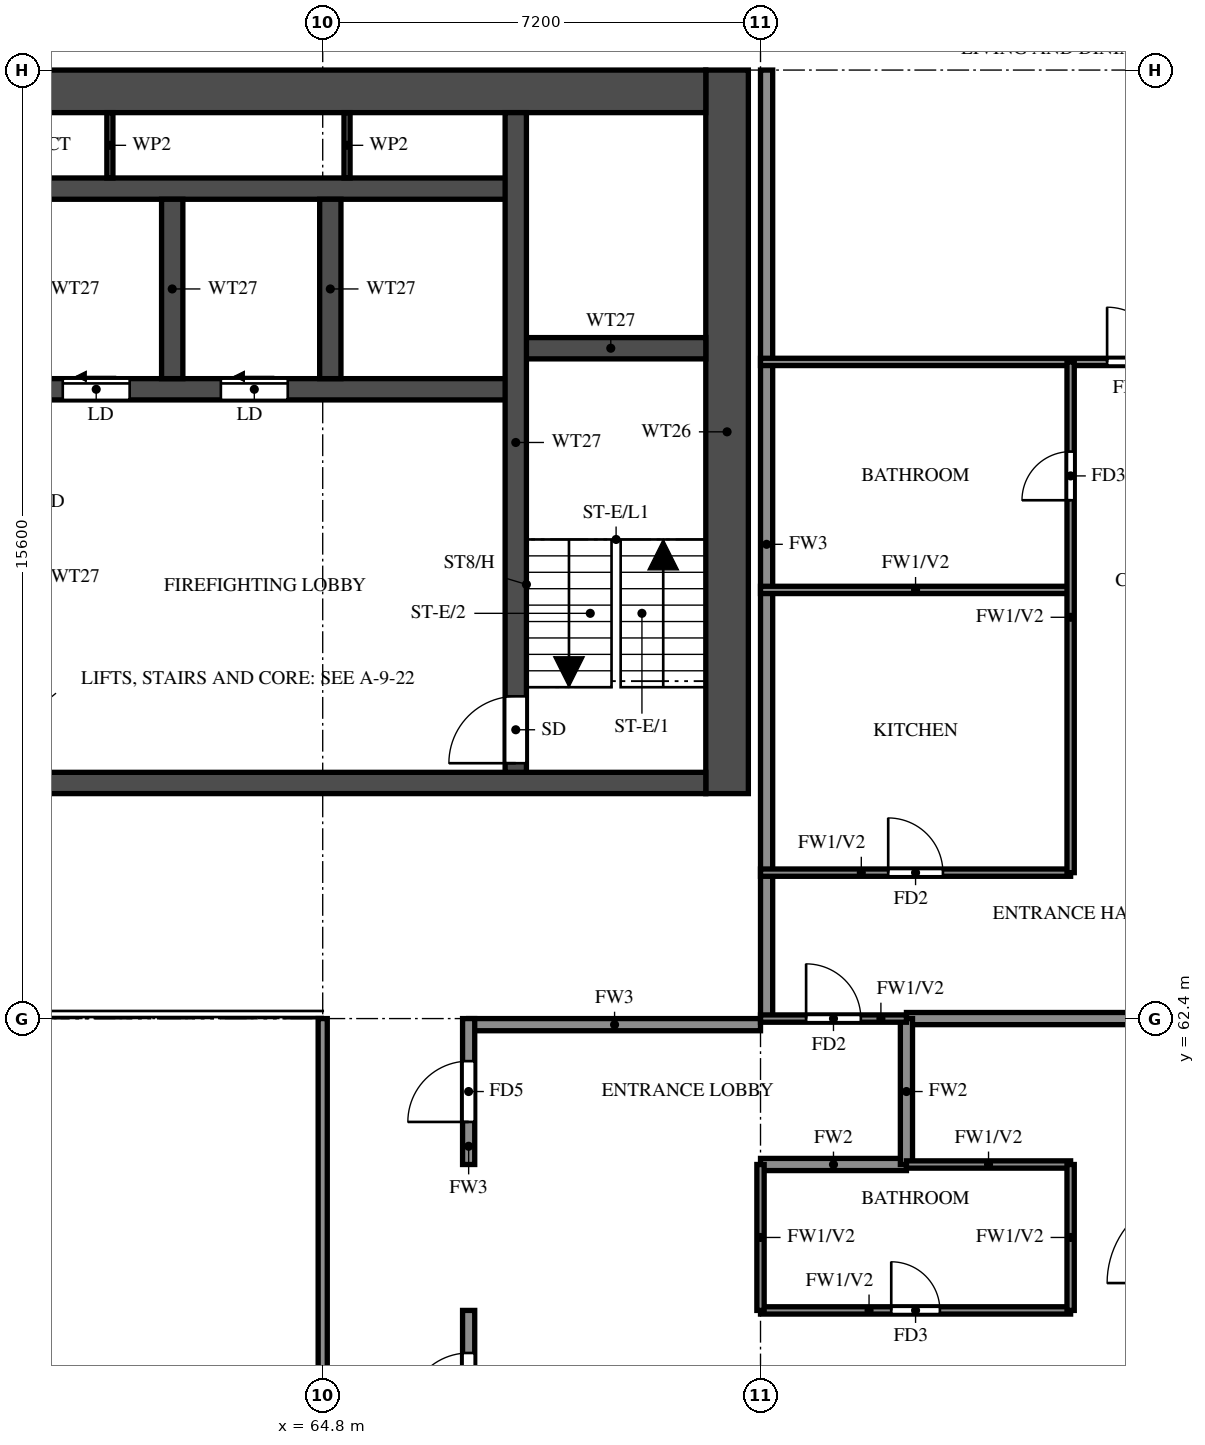
"""IFC4 building model, lengths in metres.
Left out: names, types, materials, properties, quantities, classifications, styles, units other than length and angle.
Written with IfcOpenShell. Run it as: python <this file> out.ifc"""

import sys

from ifc_helpers import new_model, si_unit, direction, frame, frame_2d, origin, place, context, subcontext, project, spatial, rectangle, extrude, element, fill, save


model = new_model("IFC4")
c1 = context("Model", 3, precision=1e-05, world=origin(), true_north=direction((0.0, 1.0)))
c2 = subcontext(c1, "Body", "Model", "MODEL_VIEW")
j1 = project(units=[si_unit("LENGTHUNIT", "METRE"), si_unit("PLANEANGLEUNIT", "RADIAN")], contexts=[c1])
p1 = place(None, origin())
s1 = spatial("IfcSite", under=j1, at=p1, CompositionType="ELEMENT")
p2 = place(p1, origin())
s2 = spatial("IfcBuilding", under=s1, at=p2, CompositionType="ELEMENT")
p3 = place(p2, frame((0.0, 0.0, 153.5)))
s3 = spatial("IfcBuildingStorey", under=s2, at=p3, CompositionType="ELEMENT", Elevation=153.5)
p4 = place(p3, frame((71.45, 66.1, 0.0), z_axis=(0.0, 0.0, 1.0), x_axis=(0.0, 1.0, 0.0)))
e1 = element("IfcWall", 1, at=p4, inside=s3, PredefinedType="SHEAR", context=c2, shape_type="SweptSolid", body=[
    extrude(rectangle(XDim=11.9, YDim=0.7, at=frame_2d((5.95, 0.0))), origin(), (0.0, 0.0, 1.0), 3.2),
])
p5 = place(p3, frame((29.7, 77.65, 0.0), z_axis=(0.0, 0.0, 1.0), x_axis=(1.0, 0.0, 0.0)))
e2 = element("IfcWall", 2, at=p5, inside=s3, PredefinedType="SHEAR", context=c2, shape_type="SweptSolid", body=[
    extrude(rectangle(XDim=41.4, YDim=0.7, at=frame_2d((20.7, 0.0))), origin(), (0.0, 0.0, 1.0), 3.2),
])
p6 = place(p3, frame((29.7, 66.275, 0.0), z_axis=(0.0, 0.0, 1.0), x_axis=(1.0, 0.0, 0.0)))
e3 = element("IfcWall", 3, at=p6, inside=s3, PredefinedType="SHEAR", context=c2, shape_type="SweptSolid", body=[
    extrude(rectangle(XDim=41.4, YDim=0.35, at=frame_2d((20.7, 0.0))), origin(), (0.0, 0.0, 1.0), 3.2),
])
p7 = place(p6, frame((0.925, 0.0, 0.0)))
e4 = element("IfcOpeningElement", 4, at=p7, cuts=e3, PredefinedType="OPENING", context=c2, shape_type="SweptSolid", body=[
    extrude(rectangle(XDim=1.1, YDim=2.1, at=frame_2d((0.55, 1.05))), frame((0.0, 0.185, 0.0), z_axis=(0.0, -1.0, 0.0), x_axis=(1.0, 0.0, 0.0)), (0.0, 0.0, 1.0), 0.37),
])
p8 = place(p6, frame((3.712, 0.0, 0.0)))
e5 = element("IfcOpeningElement", 5, at=p8, cuts=e3, PredefinedType="OPENING", context=c2, shape_type="SweptSolid", body=[
    extrude(rectangle(XDim=1.8, YDim=2.1, at=frame_2d((0.9, 1.05))), frame((0.0, 0.185, 0.0), z_axis=(0.0, -1.0, 0.0), x_axis=(1.0, 0.0, 0.0)), (0.0, 0.0, 1.0), 0.37),
])
p9 = place(p3, frame((32.825, 72.75, 0.0), z_axis=(0.0, 0.0, 1.0), x_axis=(1.0, 0.0, 0.0)))
e6 = element("IfcWall", 6, at=p9, inside=s3, PredefinedType="SHEAR", context=c2, shape_type="SweptSolid", body=[
    extrude(rectangle(XDim=35.15, YDim=0.35, at=frame_2d((17.575, 0.0))), origin(), (0.0, 0.0, 1.0), 3.2),
])
p10 = place(p9, frame((19.8, 0.0, 0.0)))
e7 = element("IfcOpeningElement", 7, at=p10, cuts=e6, PredefinedType="OPENING", context=c2, shape_type="SweptSolid", body=[
    extrude(rectangle(XDim=1.1, YDim=2.1, at=frame_2d((0.55, 1.05))), frame((0.0, 0.185, 0.0), z_axis=(0.0, -1.0, 0.0), x_axis=(1.0, 0.0, 0.0)), (0.0, 0.0, 1.0), 0.37),
])
p11 = place(p9, frame((27.7, 0.0, 0.0)))
e8 = element("IfcOpeningElement", 8, at=p11, cuts=e6, PredefinedType="OPENING", context=c2, shape_type="SweptSolid", body=[
    extrude(rectangle(XDim=1.1, YDim=2.1, at=frame_2d((0.55, 1.05))), frame((0.0, 0.185, 0.0), z_axis=(0.0, -1.0, 0.0), x_axis=(1.0, 0.0, 0.0)), (0.0, 0.0, 1.0), 0.37),
])
p12 = place(p9, frame((30.3, 0.0, 0.0)))
e9 = element("IfcOpeningElement", 9, at=p12, cuts=e6, PredefinedType="OPENING", context=c2, shape_type="SweptSolid", body=[
    extrude(rectangle(XDim=1.1, YDim=2.1, at=frame_2d((0.55, 1.05))), frame((0.0, 0.185, 0.0), z_axis=(0.0, -1.0, 0.0), x_axis=(1.0, 0.0, 0.0)), (0.0, 0.0, 1.0), 0.37),
])
p13 = place(p9, frame((3.8, 0.0, 0.0)))
e10 = element("IfcOpeningElement", 10, at=p13, cuts=e6, PredefinedType="OPENING", context=c2, shape_type="SweptSolid", body=[
    extrude(rectangle(XDim=1.1, YDim=2.1, at=frame_2d((0.55, 1.05))), frame((0.0, 0.185, 0.0), z_axis=(0.0, -1.0, 0.0), x_axis=(1.0, 0.0, 0.0)), (0.0, 0.0, 1.0), 0.37),
])
p14 = place(p9, frame((6.55, 0.0, 0.0)))
e11 = element("IfcOpeningElement", 11, at=p14, cuts=e6, PredefinedType="OPENING", context=c2, shape_type="SweptSolid", body=[
    extrude(rectangle(XDim=1.1, YDim=2.1, at=frame_2d((0.55, 1.05))), frame((0.0, 0.185, 0.0), z_axis=(0.0, -1.0, 0.0), x_axis=(1.0, 0.0, 0.0)), (0.0, 0.0, 1.0), 0.37),
])
p15 = place(p9, frame((9.3, 0.0, 0.0)))
e12 = element("IfcOpeningElement", 12, at=p15, cuts=e6, PredefinedType="OPENING", context=c2, shape_type="SweptSolid", body=[
    extrude(rectangle(XDim=1.1, YDim=2.1, at=frame_2d((0.55, 1.05))), frame((0.0, 0.185, 0.0), z_axis=(0.0, -1.0, 0.0), x_axis=(1.0, 0.0, 0.0)), (0.0, 0.0, 1.0), 0.37),
])
p16 = place(p9, frame((12.05, 0.0, 0.0)))
e13 = element("IfcOpeningElement", 13, at=p16, cuts=e6, PredefinedType="OPENING", context=c2, shape_type="SweptSolid", body=[
    extrude(rectangle(XDim=1.1, YDim=2.1, at=frame_2d((0.55, 1.05))), frame((0.0, 0.185, 0.0), z_axis=(0.0, -1.0, 0.0), x_axis=(1.0, 0.0, 0.0)), (0.0, 0.0, 1.0), 0.37),
])
p17 = place(p9, frame((14.8, 0.0, 0.0)))
e14 = element("IfcOpeningElement", 14, at=p17, cuts=e6, PredefinedType="OPENING", context=c2, shape_type="SweptSolid", body=[
    extrude(rectangle(XDim=1.1, YDim=2.1, at=frame_2d((0.55, 1.05))), frame((0.0, 0.185, 0.0), z_axis=(0.0, -1.0, 0.0), x_axis=(1.0, 0.0, 0.0)), (0.0, 0.0, 1.0), 0.37),
])
p18 = place(p9, frame((17.55, 0.0, 0.0)))
e15 = element("IfcOpeningElement", 15, at=p18, cuts=e6, PredefinedType="OPENING", context=c2, shape_type="SweptSolid", body=[
    extrude(rectangle(XDim=1.1, YDim=2.1, at=frame_2d((0.55, 1.05))), frame((0.0, 0.185, 0.0), z_axis=(0.0, -1.0, 0.0), x_axis=(1.0, 0.0, 0.0)), (0.0, 0.0, 1.0), 0.37),
])
p19 = place(p9, frame((0.938, 0.0, 0.0)))
e16 = element("IfcOpeningElement", 16, at=p19, cuts=e6, PredefinedType="OPENING", context=c2, shape_type="SweptSolid", body=[
    extrude(rectangle(XDim=1.1, YDim=2.1, at=frame_2d((0.55, 1.05))), frame((0.0, 0.185, 0.0), z_axis=(0.0, -1.0, 0.0), x_axis=(1.0, 0.0, 0.0)), (0.0, 0.0, 1.0), 0.37),
])
p20 = place(p3, frame((32.825, 76.05, 0.0), z_axis=(0.0, 0.0, 1.0), x_axis=(1.0, 0.0, 0.0)))
e17 = element("IfcWall", 17, at=p20, inside=s3, PredefinedType="SHEAR", context=c2, shape_type="SweptSolid", body=[
    extrude(rectangle(XDim=35.15, YDim=0.35, at=frame_2d((17.575, 0.0))), origin(), (0.0, 0.0, 1.0), 3.2),
])
p21 = place(p3, frame((67.975, 73.425, 0.0), z_axis=(0.0, 0.0, 1.0), x_axis=(1.0, 0.0, 0.0)))
e18 = element("IfcWall", 18, at=p21, inside=s3, PredefinedType="SHEAR", context=c2, shape_type="SweptSolid", body=[
    extrude(rectangle(XDim=3.125, YDim=0.35, at=frame_2d((1.562, 0.0))), origin(), (0.0, 0.0, 1.0), 3.2),
])
p22 = place(p3, frame((67.975, 66.45, 0.0), z_axis=(0.0, 0.0, 1.0), x_axis=(0.0, 1.0, 0.0)))
e19 = element("IfcWall", 19, at=p22, inside=s3, PredefinedType="SHEAR", context=c2, shape_type="SweptSolid", body=[
    extrude(rectangle(XDim=10.85, YDim=0.35, at=frame_2d((5.425, 0.0))), origin(), (0.0, 0.0, 1.0), 3.2),
])
p23 = place(p22, frame((0.15, 0.0, 0.0)))
e20 = element("IfcOpeningElement", 20, at=p23, cuts=e19, PredefinedType="OPENING", context=c2, shape_type="SweptSolid", body=[
    extrude(rectangle(XDim=1.1, YDim=2.1, at=frame_2d((0.55, 1.05))), frame((0.0, 0.185, 0.0), z_axis=(0.0, -1.0, 0.0), x_axis=(1.0, 0.0, 0.0)), (0.0, 0.0, 1.0), 0.37),
])
for number, where, z_axis, x_axis in (
    (21, (62.325, 72.925, 0.0), (0.0, 0.0, 1.0), (0.0, 1.0, 0.0)),
    (22, (64.925, 72.925, 0.0), (0.0, 0.0, 1.0), (0.0, 1.0, 0.0)),
):
    element("IfcWall", number, at=place(p3, frame(where, z_axis=z_axis, x_axis=x_axis)), inside=s3, PredefinedType="SHEAR", context=c2, shape_type="SweptSolid", body=[
        extrude(rectangle(XDim=2.95, YDim=0.35, at=frame_2d((1.475, 0.0))), origin(), (0.0, 0.0, 1.0), 3.2),
    ])
for number, where, z_axis, x_axis in (
    (23, (61.3, 76.225, 0.0), (0.0, 0.0, 1.0), (0.0, 1.0, 0.0)),
    (24, (65.2, 76.225, 0.0), (0.0, 0.0, 1.0), (0.0, 1.0, 0.0)),
):
    element("IfcWall", number, at=place(p3, frame(where, z_axis=z_axis, x_axis=x_axis)), inside=s3, PredefinedType="PARTITIONING", context=c2, shape_type="SweptSolid", body=[
        extrude(rectangle(XDim=1.075, YDim=0.1, at=frame_2d((0.538, 0.0))), origin(), (0.0, 0.0, 1.0), 3.2),
    ])
p24 = place(p3, frame((67.2, 62.3, 0.0), z_axis=(0.0, 0.0, 1.0), x_axis=(1.0, 0.0, 0.0)))
e25 = element("IfcWall", 25, at=p24, inside=s3, PredefinedType="SOLIDWALL", context=c2, shape_type="SweptSolid", body=[
    extrude(rectangle(XDim=4.8, YDim=0.2, at=frame_2d((2.4, 0.0))), origin(), (0.0, 0.0, 1.0), 3.2),
])
p25 = place(p3, frame((67.2, 45.6, 0.0), z_axis=(0.0, 0.0, 1.0), x_axis=(0.0, 1.0, 0.0)))
e26 = element("IfcWall", 26, at=p25, inside=s3, PredefinedType="SOLIDWALL", context=c2, shape_type="SweptSolid", body=[
    extrude(rectangle(XDim=12.0, YDim=0.2, at=frame_2d((6.0, 0.0))), origin(), (0.0, 0.0, 1.0), 3.2),
])
p26 = place(p25, frame((10.3, 0.0, 0.0)))
e27 = element("IfcOpeningElement", 27, at=p26, cuts=e26, PredefinedType="OPENING", context=c2, shape_type="SweptSolid", body=[
    extrude(rectangle(XDim=1.0, YDim=2.1, at=frame_2d((0.5, 1.05))), frame((0.0, 0.11, 0.0), z_axis=(0.0, -1.0, 0.0), x_axis=(1.0, 0.0, 0.0)), (0.0, 0.0, 1.0), 0.22),
])
p27 = place(p25, frame((0.7, 0.0, 0.0)))
e28 = element("IfcOpeningElement", 28, at=p27, cuts=e26, PredefinedType="OPENING", context=c2, shape_type="SweptSolid", body=[
    extrude(rectangle(XDim=1.0, YDim=2.1, at=frame_2d((0.5, 1.05))), frame((0.0, 0.11, 0.0), z_axis=(0.0, -1.0, 0.0), x_axis=(1.0, 0.0, 0.0)), (0.0, 0.0, 1.0), 0.22),
])
p28 = place(p3, frame((67.2, 60.0, 0.0), z_axis=(0.0, 0.0, 1.0), x_axis=(0.0, 1.0, 0.0)))
e29 = element("IfcWall", 29, at=p28, inside=s3, PredefinedType="SOLIDWALL", context=c2, shape_type="SweptSolid", body=[
    extrude(rectangle(XDim=2.4, YDim=0.2, at=frame_2d((1.2, 0.0))), origin(), (0.0, 0.0, 1.0), 3.2),
])
p29 = place(p28, frame((0.7, 0.0, 0.0)))
e30 = element("IfcOpeningElement", 30, at=p29, cuts=e29, PredefinedType="OPENING", context=c2, shape_type="SweptSolid", body=[
    extrude(rectangle(XDim=1.0, YDim=2.1, at=frame_2d((0.5, 1.05))), frame((0.0, 0.11, 0.0), z_axis=(0.0, -1.0, 0.0), x_axis=(1.0, 0.0, 0.0)), (0.0, 0.0, 1.0), 0.22),
])
p30 = place(p3, frame((72.1, 62.4, 0.0), z_axis=(0.0, 0.0, 1.0), x_axis=(0.0, 1.0, 0.0)))
e31 = element("IfcWall", 31, at=p30, inside=s3, PredefinedType="SOLIDWALL", context=c2, shape_type="SweptSolid", body=[
    extrude(rectangle(XDim=15.6, YDim=0.2, at=frame_2d((7.8, 0.0))), origin(), (0.0, 0.0, 1.0), 3.2),
])
p31 = place(p3, frame((72.0, 60.0, 0.0), z_axis=(0.0, 0.0, 1.0), x_axis=(1.0, 0.0, 0.0)))
e32 = element("IfcWall", 32, at=p31, inside=s3, PredefinedType="SOLIDWALL", context=c2, shape_type="SweptSolid", body=[
    extrude(rectangle(XDim=2.4, YDim=0.2, at=frame_2d((1.2, 0.0))), origin(), (0.0, 0.0, 1.0), 3.2),
])
p32 = place(p3, frame((74.4, 62.4, 0.0), z_axis=(0.0, 0.0, 1.0), x_axis=(1.0, 0.0, 0.0)))
e33 = element("IfcWall", 33, at=p32, inside=s3, PredefinedType="SOLIDWALL", context=c2, shape_type="SweptSolid", body=[
    extrude(rectangle(XDim=11.875, YDim=0.2, at=frame_2d((5.938, 0.0))), origin(), (0.0, 0.0, 1.0), 3.2),
])
p33 = place(p3, frame((74.4, 60.0, 0.0), z_axis=(0.0, 0.0, 1.0), x_axis=(0.0, 1.0, 0.0)))
e34 = element("IfcWall", 34, at=p33, inside=s3, PredefinedType="SOLIDWALL", context=c2, shape_type="SweptSolid", body=[
    extrude(rectangle(XDim=2.4, YDim=0.2, at=frame_2d((1.2, 0.0))), origin(), (0.0, 0.0, 1.0), 3.2),
])
p34 = place(p3, frame((72.0, 57.6, 0.0), z_axis=(0.0, 0.0, 1.0), x_axis=(1.0, 0.0, 0.0)))
e35 = element("IfcWall", 35, at=p34, inside=s3, PredefinedType="PARTITIONING", context=c2, shape_type="SweptSolid", body=[
    extrude(rectangle(XDim=5.1, YDim=0.12, at=frame_2d((2.55, 0.0))), origin(), (0.0, 0.0, 1.0), 3.2),
])
p35 = place(p34, frame((2.15, 0.0, 0.0)))
e36 = element("IfcOpeningElement", 36, at=p35, cuts=e35, PredefinedType="OPENING", context=c2, shape_type="SweptSolid", body=[
    extrude(rectangle(XDim=0.8, YDim=2.1, at=frame_2d((0.4, 1.05))), frame((0.0, 0.07, 0.0), z_axis=(0.0, -1.0, 0.0), x_axis=(1.0, 0.0, 0.0)), (0.0, 0.0, 1.0), 0.14),
])
p36 = place(p3, frame((74.4, 60.0, 0.0), z_axis=(0.0, 0.0, 1.0), x_axis=(1.0, 0.0, 0.0)))
e37 = element("IfcWall", 37, at=p36, inside=s3, PredefinedType="PARTITIONING", context=c2, shape_type="SweptSolid", body=[
    extrude(rectangle(XDim=2.7, YDim=0.12, at=frame_2d((1.35, 0.0))), origin(), (0.0, 0.0, 1.0), 3.2),
])
p37 = place(p3, frame((72.0, 62.4, 0.0), z_axis=(0.0, 0.0, 1.0), x_axis=(1.0, 0.0, 0.0)))
e38 = element("IfcWall", 38, at=p37, inside=s3, PredefinedType="PARTITIONING", context=c2, shape_type="SweptSolid", body=[
    extrude(rectangle(XDim=2.4, YDim=0.12, at=frame_2d((1.2, 0.0))), origin(), (0.0, 0.0, 1.0), 3.2),
])
p38 = place(p37, frame((0.75, 0.0, 0.0)))
e39 = element("IfcOpeningElement", 39, at=p38, cuts=e38, PredefinedType="OPENING", context=c2, shape_type="SweptSolid", body=[
    extrude(rectangle(XDim=0.9, YDim=2.1, at=frame_2d((0.45, 1.05))), frame((0.0, 0.07, 0.0), z_axis=(0.0, -1.0, 0.0), x_axis=(1.0, 0.0, 0.0)), (0.0, 0.0, 1.0), 0.14),
])
p39 = place(p3, frame((72.0, 64.8, 0.0), z_axis=(0.0, 0.0, 1.0), x_axis=(1.0, 0.0, 0.0)))
e40 = element("IfcWall", 40, at=p39, inside=s3, PredefinedType="PARTITIONING", context=c2, shape_type="SweptSolid", body=[
    extrude(rectangle(XDim=5.1, YDim=0.12, at=frame_2d((2.55, 0.0))), origin(), (0.0, 0.0, 1.0), 3.2),
])
p40 = place(p39, frame((2.1, 0.0, 0.0)))
e41 = element("IfcOpeningElement", 41, at=p40, cuts=e40, PredefinedType="OPENING", context=c2, shape_type="SweptSolid", body=[
    extrude(rectangle(XDim=0.9, YDim=2.1, at=frame_2d((0.45, 1.05))), frame((0.0, 0.07, 0.0), z_axis=(0.0, -1.0, 0.0), x_axis=(1.0, 0.0, 0.0)), (0.0, 0.0, 1.0), 0.14),
])
p41 = place(p3, frame((72.0, 69.45, 0.0), z_axis=(0.0, 0.0, 1.0), x_axis=(1.0, 0.0, 0.0)))
e42 = element("IfcWall", 42, at=p41, inside=s3, PredefinedType="PARTITIONING", context=c2, shape_type="SweptSolid", body=[
    extrude(rectangle(XDim=5.1, YDim=0.12, at=frame_2d((2.55, 0.0))), origin(), (0.0, 0.0, 1.0), 3.2),
])
p42 = place(p3, frame((72.0, 73.2, 0.0), z_axis=(0.0, 0.0, 1.0), x_axis=(1.0, 0.0, 0.0)))
e43 = element("IfcWall", 43, at=p42, inside=s3, PredefinedType="PARTITIONING", context=c2, shape_type="SweptSolid", body=[
    extrude(rectangle(XDim=14.275, YDim=0.12, at=frame_2d((7.137, 0.0))), origin(), (0.0, 0.0, 1.0), 2.3),
])
p43 = place(p42, frame((5.7, 0.0, 0.0)))
e44 = element("IfcOpeningElement", 44, at=p43, cuts=e43, PredefinedType="OPENING", context=c2, shape_type="SweptSolid", body=[
    extrude(rectangle(XDim=0.9, YDim=2.1, at=frame_2d((0.45, 1.05))), frame((0.0, 0.07, 0.0), z_axis=(0.0, -1.0, 0.0), x_axis=(1.0, 0.0, 0.0)), (0.0, 0.0, 1.0), 0.14),
])
for number, where, z_axis, x_axis in (
    (45, (72.0, 57.6, 0.0), (0.0, 0.0, 1.0), (0.0, 1.0, 0.0)),
    (46, (77.1, 57.6, 0.0), (0.0, 0.0, 1.0), (0.0, 1.0, 0.0)),
):
    element("IfcWall", number, at=place(p3, frame(where, z_axis=z_axis, x_axis=x_axis)), inside=s3, PredefinedType="PARTITIONING", context=c2, shape_type="SweptSolid", body=[
        extrude(rectangle(XDim=2.4, YDim=0.12, at=frame_2d((1.2, 0.0))), origin(), (0.0, 0.0, 1.0), 3.2),
    ])
p44 = place(p3, frame((77.1, 64.8, 0.0), z_axis=(0.0, 0.0, 1.0), x_axis=(0.0, 1.0, 0.0)))
e47 = element("IfcWall", 47, at=p44, inside=s3, PredefinedType="PARTITIONING", context=c2, shape_type="SweptSolid", body=[
    extrude(rectangle(XDim=8.4, YDim=0.12, at=frame_2d((4.2, 0.0))), origin(), (0.0, 0.0, 1.0), 3.2),
])
p45 = place(p44, frame((6.125, 0.0, 0.0)))
e48 = element("IfcOpeningElement", 48, at=p45, cuts=e47, PredefinedType="OPENING", context=c2, shape_type="SweptSolid", body=[
    extrude(rectangle(XDim=0.8, YDim=2.1, at=frame_2d((0.4, 1.05))), frame((0.0, 0.07, 0.0), z_axis=(0.0, -1.0, 0.0), x_axis=(1.0, 0.0, 0.0)), (0.0, 0.0, 1.0), 0.14),
])
p46 = place(p3, frame((64.8, 48.0, 0.0), z_axis=(0.0, 0.0, 1.0), x_axis=(0.0, 1.0, 0.0)))
e49 = element("IfcWall", 49, at=p46, inside=s3, PredefinedType="SOLIDWALL", context=c2, shape_type="SweptSolid", body=[
    extrude(rectangle(XDim=14.4, YDim=0.15, at=frame_2d((7.2, 0.0))), origin(), (0.0, 0.0, 1.0), 2.3),
])
p47 = place(p23, origin())
e50 = element("IfcDoor", 50, at=p47, inside=s3, OperationType="SINGLE_SWING_LEFT", PredefinedType="DOOR", context=c2, shape_type="SweptSolid", body=[
    extrude(rectangle(XDim=1.1, YDim=2.1, at=frame_2d((0.55, 1.05))), frame((0.0, 0.025, 0.0), z_axis=(0.0, -1.0, 0.0), x_axis=(1.0, 0.0, 0.0)), (0.0, 0.0, 1.0), 0.05),
])
fill(e20, e50)
p48 = place(p11, origin())
e51 = element("IfcDoor", 51, at=p48, inside=s3, OperationType="SLIDING_TO_LEFT", PredefinedType="DOOR", context=c2, shape_type="SweptSolid", body=[
    extrude(rectangle(XDim=1.1, YDim=2.1, at=frame_2d((0.55, 1.05))), frame((0.0, 0.025, 0.0), z_axis=(0.0, -1.0, 0.0), x_axis=(1.0, 0.0, 0.0)), (0.0, 0.0, 1.0), 0.05),
])
fill(e8, e51)
p49 = place(p12, origin())
e52 = element("IfcDoor", 52, at=p49, inside=s3, OperationType="SLIDING_TO_LEFT", PredefinedType="DOOR", context=c2, shape_type="SweptSolid", body=[
    extrude(rectangle(XDim=1.1, YDim=2.1, at=frame_2d((0.55, 1.05))), frame((0.0, 0.025, 0.0), z_axis=(0.0, -1.0, 0.0), x_axis=(1.0, 0.0, 0.0)), (0.0, 0.0, 1.0), 0.05),
])
fill(e9, e52)
p50 = place(p26, origin())
e53 = element("IfcDoor", 53, at=p50, inside=s3, OperationType="SINGLE_SWING_LEFT", PredefinedType="DOOR", context=c2, shape_type="SweptSolid", body=[
    extrude(rectangle(XDim=1.0, YDim=2.1, at=frame_2d((0.5, 1.05))), frame((0.0, 0.025, 0.0), z_axis=(0.0, -1.0, 0.0), x_axis=(1.0, 0.0, 0.0)), (0.0, 0.0, 1.0), 0.05),
])
fill(e27, e53)
p51 = place(p35, origin())
e54 = element("IfcDoor", 54, at=p51, inside=s3, OperationType="SINGLE_SWING_LEFT", PredefinedType="DOOR", context=c2, shape_type="SweptSolid", body=[
    extrude(rectangle(XDim=0.8, YDim=2.1, at=frame_2d((0.4, 1.05))), frame((0.0, 0.025, 0.0), z_axis=(0.0, -1.0, 0.0), x_axis=(1.0, 0.0, 0.0)), (0.0, 0.0, 1.0), 0.05),
])
fill(e36, e54)
p52 = place(p38, origin())
e55 = element("IfcDoor", 55, at=p52, inside=s3, OperationType="SINGLE_SWING_LEFT", PredefinedType="DOOR", context=c2, shape_type="SweptSolid", body=[
    extrude(rectangle(XDim=0.9, YDim=2.1, at=frame_2d((0.45, 1.05))), frame((0.0, 0.025, 0.0), z_axis=(0.0, -1.0, 0.0), x_axis=(1.0, 0.0, 0.0)), (0.0, 0.0, 1.0), 0.05),
])
fill(e39, e55)
p53 = place(p29, origin())
e56 = element("IfcDoor", 56, at=p53, inside=s3, OperationType="SINGLE_SWING_LEFT", PredefinedType="DOOR", context=c2, shape_type="SweptSolid", body=[
    extrude(rectangle(XDim=1.0, YDim=2.1, at=frame_2d((0.5, 1.05))), frame((0.0, 0.025, 0.0), z_axis=(0.0, -1.0, 0.0), x_axis=(1.0, 0.0, 0.0)), (0.0, 0.0, 1.0), 0.05),
])
fill(e30, e56)
p54 = place(p43, origin())
e57 = element("IfcDoor", 57, at=p54, inside=s3, OperationType="SINGLE_SWING_RIGHT", PredefinedType="DOOR", context=c2, shape_type="SweptSolid", body=[
    extrude(rectangle(XDim=0.9, YDim=2.1, at=frame_2d((0.45, 1.05))), frame((0.0, 0.025, 0.0), z_axis=(0.0, -1.0, 0.0), x_axis=(1.0, 0.0, 0.0)), (0.0, 0.0, 1.0), 0.05),
])
fill(e44, e57)
p55 = place(p40, origin())
e58 = element("IfcDoor", 58, at=p55, inside=s3, OperationType="SINGLE_SWING_LEFT", PredefinedType="DOOR", context=c2, shape_type="SweptSolid", body=[
    extrude(rectangle(XDim=0.9, YDim=2.1, at=frame_2d((0.45, 1.05))), frame((0.0, 0.025, 0.0), z_axis=(0.0, -1.0, 0.0), x_axis=(1.0, 0.0, 0.0)), (0.0, 0.0, 1.0), 0.05),
])
fill(e41, e58)
p56 = place(p45, origin())
e59 = element("IfcDoor", 59, at=p56, inside=s3, OperationType="SINGLE_SWING_LEFT", PredefinedType="DOOR", context=c2, shape_type="SweptSolid", body=[
    extrude(rectangle(XDim=0.8, YDim=2.1, at=frame_2d((0.4, 1.05))), frame((0.0, 0.025, 0.0), z_axis=(0.0, -1.0, 0.0), x_axis=(1.0, 0.0, 0.0)), (0.0, 0.0, 1.0), 0.05),
])
fill(e48, e59)
save(model, sys.argv[1])
